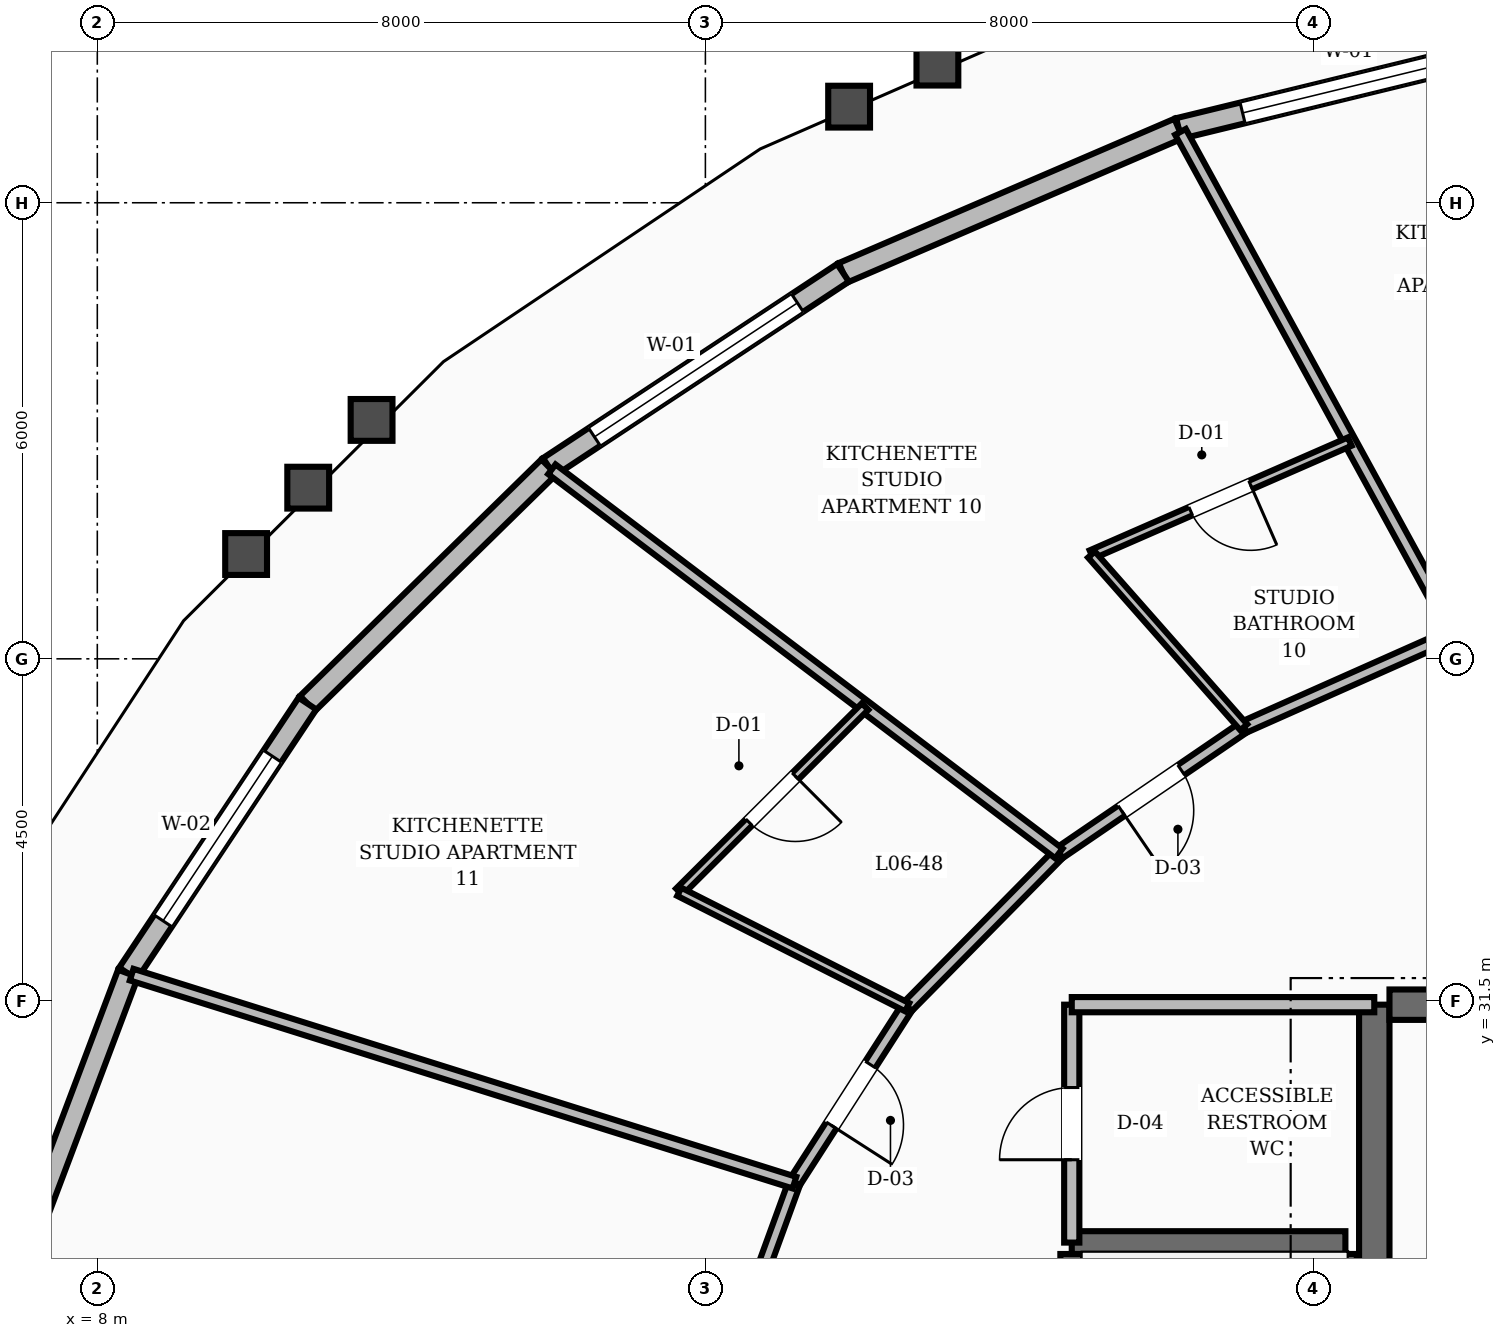
"""IFC4 building model, lengths in metres.
Left out: names, types, materials, properties, quantities, classifications, styles, units other than length and angle.
Written with IfcOpenShell. Run it as: python <this file> out.ifc"""

import sys

from ifc_helpers import new_model, si_unit, direction, frame, frame_2d, origin, place, context, subcontext, project, spatial, rectangle, extrude, element, fill, save


model = new_model("IFC4")
c1 = context("Model", 3, precision=1e-05, world=origin(), true_north=direction((0.0, 1.0)))
c2 = subcontext(c1, "Body", "Model", "MODEL_VIEW")
j1 = project(units=[si_unit("LENGTHUNIT", "METRE"), si_unit("PLANEANGLEUNIT", "RADIAN")], contexts=[c1])
p1 = place(None, origin())
s1 = spatial("IfcSite", under=j1, at=p1, CompositionType="ELEMENT")
p2 = place(p1, origin())
s2 = spatial("IfcBuilding", under=s1, at=p2, CompositionType="ELEMENT")
p3 = place(p2, frame((0.0, 0.0, 30.4)))
s3 = spatial("IfcBuildingStorey", under=s2, at=p3, CompositionType="ELEMENT", Elevation=30.4)
p4 = place(p3, frame((24.8, 25.15, 0.0), z_axis=(0.0, 0.0, 1.0), x_axis=(0.0, 1.0, 0.0)))
e1 = element("IfcWall", 1, at=p4, inside=s3, PredefinedType="SHEAR", context=c2, shape_type="SweptSolid", body=[
    extrude(rectangle(XDim=6.3, YDim=0.4, at=frame_2d((3.15, 0.0))), origin(), (0.0, 0.0, 1.0), 3.6),
])
p5 = place(p3, frame((25.0, 31.45, 0.0), z_axis=(0.0, 0.0, 1.0), x_axis=(1.0, 0.0, 0.0)))
e2 = element("IfcWall", 2, at=p5, inside=s3, PredefinedType="SHEAR", context=c2, shape_type="SweptSolid", body=[
    extrude(rectangle(XDim=3.2, YDim=0.4, at=frame_2d((1.6, 0.0))), origin(), (0.0, 0.0, 1.0), 3.6),
])
for number, where, z_axis, x_axis in (
    (3, (20.82, 19.43, 0.0), (0.0, 0.0, 1.0), (0.0, 1.0, 0.0)),
    (4, (24.42, 19.43, 0.0), (0.0, 0.0, 1.0), (0.0, 1.0, 0.0)),
):
    element("IfcWall", number, at=place(p3, frame(where, z_axis=z_axis, x_axis=x_axis)), inside=s3, PredefinedType="SHEAR", context=c2, shape_type="SweptSolid", body=[
        extrude(rectangle(XDim=8.74, YDim=0.3, at=frame_2d((4.37, 0.0))), origin(), (0.0, 0.0, 1.0), 3.6),
    ])
p6 = place(p3, frame((20.82, 28.32, 0.0), z_axis=(0.0, 0.0, 1.0), x_axis=(1.0, 0.0, 0.0)))
e5 = element("IfcWall", 5, at=p6, inside=s3, PredefinedType="SHEAR", context=c2, shape_type="SweptSolid", body=[
    extrude(rectangle(XDim=3.6, YDim=0.3, at=frame_2d((1.8, 0.0))), origin(), (0.0, 0.0, 1.0), 3.6),
])
p7 = place(p3, frame((27.017, 44.145, 0.0), z_axis=(0.0, 0.0, 1.0), x_axis=(-0.97151283312, -0.236986951292, 0.0)))
e6 = element("IfcWall", 6, at=p7, inside=s3, PredefinedType="STANDARD", context=c2, shape_type="SweptSolid", body=[
    extrude(rectangle(XDim=4.931, YDim=0.28, at=frame_2d((2.466, 0.0))), origin(), (0.0, 0.0, 1.0), 2.65),
])
p8 = place(p7, frame((0.866, 0.0, 0.8)))
e7 = element("IfcOpeningElement", 7, at=p8, cuts=e6, PredefinedType="OPENING", context=c2, shape_type="SweptSolid", body=[
    extrude(rectangle(XDim=3.2, YDim=1.65, at=frame_2d((1.6, 0.825))), frame((0.0, 0.15, 0.0), z_axis=(0.0, -1.0, 0.0), x_axis=(1.0, 0.0, 0.0)), (0.0, 0.0, 1.0), 0.3),
])
p9 = place(p3, frame((22.226, 42.977, 0.0), z_axis=(0.0, 0.0, 1.0), x_axis=(-0.918705683067, -0.394942866629, 0.0)))
e8 = element("IfcWall", 8, at=p9, inside=s3, PredefinedType="STANDARD", context=c2, shape_type="SweptSolid", body=[
    extrude(rectangle(XDim=4.806, YDim=0.28, at=frame_2d((2.403, 0.0))), origin(), (0.0, 0.0, 1.0), 2.65),
])
p10 = place(p3, frame((17.811, 41.078, 0.0), z_axis=(0.0, 0.0, 1.0), x_axis=(-0.834608922487, -0.550842941776, 0.0)))
e9 = element("IfcWall", 9, at=p10, inside=s3, PredefinedType="STANDARD", context=c2, shape_type="SweptSolid", body=[
    extrude(rectangle(XDim=4.637, YDim=0.28, at=frame_2d((2.319, 0.0))), origin(), (0.0, 0.0, 1.0), 2.65),
])
p11 = place(p10, frame((0.719, 0.0, 0.8)))
e10 = element("IfcOpeningElement", 10, at=p11, cuts=e9, PredefinedType="OPENING", context=c2, shape_type="SweptSolid", body=[
    extrude(rectangle(XDim=3.2, YDim=1.65, at=frame_2d((1.6, 0.825))), frame((0.0, 0.15, 0.0), z_axis=(0.0, -1.0, 0.0), x_axis=(1.0, 0.0, 0.0)), (0.0, 0.0, 1.0), 0.3),
])
p12 = place(p3, frame((13.94, 38.524, 0.0), z_axis=(0.0, 0.0, 1.0), x_axis=(-0.714207899037, -0.699933623248, 0.0)))
e11 = element("IfcWall", 11, at=p12, inside=s3, PredefinedType="STANDARD", context=c2, shape_type="SweptSolid", body=[
    extrude(rectangle(XDim=4.447, YDim=0.28, at=frame_2d((2.224, 0.0))), origin(), (0.0, 0.0, 1.0), 2.65),
])
p13 = place(p3, frame((10.764, 35.411, 0.0), z_axis=(0.0, 0.0, 1.0), x_axis=(-0.55356334222, -0.832807076189, 0.0)))
e12 = element("IfcWall", 12, at=p13, inside=s3, PredefinedType="STANDARD", context=c2, shape_type="SweptSolid", body=[
    extrude(rectangle(XDim=4.264, YDim=0.28, at=frame_2d((2.132, 0.0))), origin(), (0.0, 0.0, 1.0), 2.65),
])
p14 = place(p13, frame((0.832, 0.0, 0.8)))
e13 = element("IfcOpeningElement", 13, at=p14, cuts=e12, PredefinedType="OPENING", context=c2, shape_type="SweptSolid", body=[
    extrude(rectangle(XDim=2.6, YDim=1.65, at=frame_2d((1.3, 0.825))), frame((0.0, 0.15, 0.0), z_axis=(0.0, -1.0, 0.0), x_axis=(1.0, 0.0, 0.0)), (0.0, 0.0, 1.0), 0.3),
])
p15 = place(p3, frame((8.404, 31.86, 0.0), z_axis=(0.0, 0.0, 1.0), x_axis=(-0.352909401731, -0.935657498324, 0.0)))
e14 = element("IfcWall", 14, at=p15, inside=s3, PredefinedType="STANDARD", context=c2, shape_type="SweptSolid", body=[
    extrude(rectangle(XDim=4.118, YDim=0.28, at=frame_2d((2.059, 0.0))), origin(), (0.0, 0.0, 1.0), 2.65),
])
p16 = place(p3, frame((20.82, 28.32, 0.0), z_axis=(0.0, 0.0, 1.0), x_axis=(0.0, 1.0, 0.0)))
e15 = element("IfcWall", 15, at=p16, inside=s3, PredefinedType="SOLIDWALL", context=c2, shape_type="SweptSolid", body=[
    extrude(rectangle(XDim=3.13, YDim=0.2, at=frame_2d((1.565, 0.0))), origin(), (0.0, 0.0, 1.0), 2.61),
])
p17 = place(p16, frame((1.09, 0.0, 0.0)))
e16 = element("IfcOpeningElement", 16, at=p17, cuts=e15, PredefinedType="OPENING", context=c2, shape_type="SweptSolid", body=[
    extrude(rectangle(XDim=0.95, YDim=2.1, at=frame_2d((0.475, 1.05))), frame((0.0, 0.11, 0.0), z_axis=(0.0, -1.0, 0.0), x_axis=(1.0, 0.0, 0.0)), (0.0, 0.0, 1.0), 0.22),
])
p18 = place(p3, frame((20.82, 31.45, 0.0), z_axis=(0.0, 0.0, 1.0), x_axis=(1.0, 0.0, 0.0)))
e17 = element("IfcWall", 17, at=p18, inside=s3, PredefinedType="SOLIDWALL", context=c2, shape_type="SweptSolid", body=[
    extrude(rectangle(XDim=3.98, YDim=0.2, at=frame_2d((1.99, 0.0))), origin(), (0.0, 0.0, 1.0), 2.61),
])
p19 = place(p3, frame((25.858, 36.334, 0.0), z_axis=(0.0, 0.0, 1.0), x_axis=(-0.913768445178, -0.406235434936, 0.0)))
e18 = element("IfcWall", 18, at=p19, inside=s3, PredefinedType="SOLIDWALL", context=c2, shape_type="SweptSolid", body=[
    extrude(rectangle(XDim=3.037, YDim=0.16, at=frame_2d((1.519, 0.0))), origin(), (0.0, 0.0, 1.0), 2.61),
])
p20 = place(p3, frame((23.083, 35.1, 0.0), z_axis=(0.0, 0.0, 1.0), x_axis=(-0.825929039072, -0.563774088104, 0.0)))
e19 = element("IfcWall", 19, at=p20, inside=s3, PredefinedType="SOLIDWALL", context=c2, shape_type="SweptSolid", body=[
    extrude(rectangle(XDim=2.945, YDim=0.16, at=frame_2d((1.472, 0.0))), origin(), (0.0, 0.0, 1.0), 2.61),
])
p21 = place(p20, frame((0.997, 0.0, 0.0)))
e20 = element("IfcOpeningElement", 20, at=p21, cuts=e19, PredefinedType="OPENING", context=c2, shape_type="SweptSolid", body=[
    extrude(rectangle(XDim=0.95, YDim=2.1, at=frame_2d((0.475, 1.05))), frame((0.0, 0.09, 0.0), z_axis=(0.0, -1.0, 0.0), x_axis=(1.0, 0.0, 0.0)), (0.0, 0.0, 1.0), 0.18),
])
p22 = place(p3, frame((20.651, 33.44, 0.0), z_axis=(0.0, 0.0, 1.0), x_axis=(-0.702366174226, -0.711815816981, 0.0)))
e21 = element("IfcWall", 21, at=p22, inside=s3, PredefinedType="SOLIDWALL", context=c2, shape_type="SweptSolid", body=[
    extrude(rectangle(XDim=2.842, YDim=0.16, at=frame_2d((1.421, 0.0))), origin(), (0.0, 0.0, 1.0), 2.61),
])
p23 = place(p3, frame((18.655, 31.417, 0.0), z_axis=(0.0, 0.0, 1.0), x_axis=(-0.540595670038, -0.841282545603, 0.0)))
e22 = element("IfcWall", 22, at=p23, inside=s3, PredefinedType="SOLIDWALL", context=c2, shape_type="SweptSolid", body=[
    extrude(rectangle(XDim=2.744, YDim=0.16, at=frame_2d((1.372, 0.0))), origin(), (0.0, 0.0, 1.0), 2.61),
])
p24 = place(p23, frame((0.897, 0.0, 0.0)))
e23 = element("IfcOpeningElement", 23, at=p24, cuts=e22, PredefinedType="OPENING", context=c2, shape_type="SweptSolid", body=[
    extrude(rectangle(XDim=0.95, YDim=2.1, at=frame_2d((0.475, 1.05))), frame((0.0, 0.09, 0.0), z_axis=(0.0, -1.0, 0.0), x_axis=(1.0, 0.0, 0.0)), (0.0, 0.0, 1.0), 0.18),
])
p25 = place(p3, frame((17.172, 29.109, 0.0), z_axis=(0.0, 0.0, 1.0), x_axis=(-0.342617982381, -0.939474809747, 0.0)))
e24 = element("IfcWall", 24, at=p25, inside=s3, PredefinedType="SOLIDWALL", context=c2, shape_type="SweptSolid", body=[
    extrude(rectangle(XDim=2.666, YDim=0.16, at=frame_2d((1.333, 0.0))), origin(), (0.0, 0.0, 1.0), 2.61),
])
p26 = place(p3, frame((25.858, 36.334, 0.0), z_axis=(0.0, 0.0, 1.0), x_axis=(-0.479700277593, 0.877432415447, 0.0)))
e25 = element("IfcWall", 25, at=p26, inside=s3, PredefinedType="SOLIDWALL", context=c2, shape_type="SweptSolid", body=[
    extrude(rectangle(XDim=7.521, YDim=0.16, at=frame_2d((3.76, 0.0))), origin(), (0.0, 0.0, 1.0), 2.61),
])
p27 = place(p3, frame((24.478, 38.858, 0.0), z_axis=(0.0, 0.0, 1.0), x_axis=(-0.916219264282, -0.400677251361, 0.0)))
e26 = element("IfcWall", 26, at=p27, inside=s3, PredefinedType="PARTITIONING", context=c2, shape_type="SweptSolid", body=[
    extrude(rectangle(XDim=3.709, YDim=0.12, at=frame_2d((1.854, 0.0))), origin(), (0.0, 0.0, 1.0), 2.61),
])
p28 = place(p27, frame((1.425, 0.0, 0.0)))
e27 = element("IfcOpeningElement", 27, at=p28, cuts=e26, PredefinedType="OPENING", context=c2, shape_type="SweptSolid", body=[
    extrude(rectangle(XDim=0.86, YDim=2.1, at=frame_2d((0.43, 1.05))), frame((0.0, 0.07, 0.0), z_axis=(0.0, -1.0, 0.0), x_axis=(1.0, 0.0, 0.0)), (0.0, 0.0, 1.0), 0.14),
])
p29 = place(p3, frame((23.083, 35.1, 0.0), z_axis=(0.0, 0.0, 1.0), x_axis=(-0.661427007528, 0.750009542414, 0.0)))
e28 = element("IfcWall", 28, at=p29, inside=s3, PredefinedType="PARTITIONING", context=c2, shape_type="SweptSolid", body=[
    extrude(rectangle(XDim=3.029, YDim=0.12, at=frame_2d((1.515, 0.0))), origin(), (0.0, 0.0, 1.0), 2.61),
])
p30 = place(p3, frame((20.651, 33.44, 0.0), z_axis=(0.0, 0.0, 1.0), x_axis=(-0.797056829768, 0.603904305433, 0.0)))
e29 = element("IfcWall", 29, at=p30, inside=s3, PredefinedType="SOLIDWALL", context=c2, shape_type="SweptSolid", body=[
    extrude(rectangle(XDim=8.369, YDim=0.16, at=frame_2d((4.185, 0.0))), origin(), (0.0, 0.0, 1.0), 2.61),
])
p31 = place(p3, frame((18.101, 35.372, 0.0), z_axis=(0.0, 0.0, 1.0), x_axis=(-0.708166962486, -0.706045007944, 0.0)))
e30 = element("IfcWall", 30, at=p31, inside=s3, PredefinedType="PARTITIONING", context=c2, shape_type="SweptSolid", body=[
    extrude(rectangle(XDim=3.452, YDim=0.12, at=frame_2d((1.726, 0.0))), origin(), (0.0, 0.0, 1.0), 2.61),
])
p32 = place(p31, frame((1.296, 0.0, 0.0)))
e31 = element("IfcOpeningElement", 31, at=p32, cuts=e30, PredefinedType="OPENING", context=c2, shape_type="SweptSolid", body=[
    extrude(rectangle(XDim=0.86, YDim=2.1, at=frame_2d((0.43, 1.05))), frame((0.0, 0.07, 0.0), z_axis=(0.0, -1.0, 0.0), x_axis=(1.0, 0.0, 0.0)), (0.0, 0.0, 1.0), 0.14),
])
p33 = place(p3, frame((18.655, 31.417, 0.0), z_axis=(0.0, 0.0, 1.0), x_axis=(-0.892193104213, 0.451654142895, 0.0)))
e32 = element("IfcWall", 32, at=p33, inside=s3, PredefinedType="PARTITIONING", context=c2, shape_type="SweptSolid", body=[
    extrude(rectangle(XDim=3.361, YDim=0.12, at=frame_2d((1.68, 0.0))), origin(), (0.0, 0.0, 1.0), 2.61),
])
p34 = place(p3, frame((17.172, 29.109, 0.0), z_axis=(0.0, 0.0, 1.0), x_axis=(-0.954123744585, 0.299412558218, 0.0)))
e33 = element("IfcWall", 33, at=p34, inside=s3, PredefinedType="SOLIDWALL", context=c2, shape_type="SweptSolid", body=[
    extrude(rectangle(XDim=9.139, YDim=0.16, at=frame_2d((4.569, 0.0))), origin(), (0.0, 0.0, 1.0), 2.61),
])
p35 = place(p8, origin())
e34 = element("IfcWindow", 34, at=p35, inside=s3, PartitioningType="SINGLE_PANEL", PredefinedType="WINDOW", context=c2, shape_type="SweptSolid", body=[
    extrude(rectangle(XDim=3.2, YDim=1.65, at=frame_2d((1.6, 0.825))), frame((0.0, 0.03, 0.0), z_axis=(0.0, -1.0, 0.0), x_axis=(1.0, 0.0, 0.0)), (0.0, 0.0, 1.0), 0.06),
])
fill(e7, e34)
p36 = place(p11, origin())
e35 = element("IfcWindow", 35, at=p36, inside=s3, PartitioningType="SINGLE_PANEL", PredefinedType="WINDOW", context=c2, shape_type="SweptSolid", body=[
    extrude(rectangle(XDim=3.2, YDim=1.65, at=frame_2d((1.6, 0.825))), frame((0.0, 0.03, 0.0), z_axis=(0.0, -1.0, 0.0), x_axis=(1.0, 0.0, 0.0)), (0.0, 0.0, 1.0), 0.06),
])
fill(e10, e35)
p37 = place(p14, origin())
e36 = element("IfcWindow", 36, at=p37, inside=s3, PartitioningType="SINGLE_PANEL", PredefinedType="WINDOW", context=c2, shape_type="SweptSolid", body=[
    extrude(rectangle(XDim=2.6, YDim=1.65, at=frame_2d((1.3, 0.825))), frame((0.0, 0.03, 0.0), z_axis=(0.0, -1.0, 0.0), x_axis=(1.0, 0.0, 0.0)), (0.0, 0.0, 1.0), 0.06),
])
fill(e13, e36)
p38 = place(p17, origin())
e37 = element("IfcDoor", 37, at=p38, inside=s3, OperationType="SINGLE_SWING_LEFT", PredefinedType="DOOR", context=c2, shape_type="SweptSolid", body=[
    extrude(rectangle(XDim=0.95, YDim=2.1, at=frame_2d((0.475, 1.05))), frame((0.0, 0.025, 0.0), z_axis=(0.0, -1.0, 0.0), x_axis=(1.0, 0.0, 0.0)), (0.0, 0.0, 1.0), 0.05),
])
fill(e16, e37)
p39 = place(p28, origin())
e38 = element("IfcDoor", 38, at=p39, inside=s3, OperationType="SINGLE_SWING_LEFT", PredefinedType="DOOR", context=c2, shape_type="SweptSolid", body=[
    extrude(rectangle(XDim=0.86, YDim=2.1, at=frame_2d((0.43, 1.05))), frame((0.0, 0.025, 0.0), z_axis=(0.0, -1.0, 0.0), x_axis=(1.0, 0.0, 0.0)), (0.0, 0.0, 1.0), 0.05),
])
fill(e27, e38)
p40 = place(p21, origin())
e39 = element("IfcDoor", 39, at=p40, inside=s3, OperationType="SINGLE_SWING_RIGHT", PredefinedType="DOOR", context=c2, shape_type="SweptSolid", body=[
    extrude(rectangle(XDim=0.95, YDim=2.1, at=frame_2d((0.475, 1.05))), frame((0.0, 0.025, 0.0), z_axis=(0.0, -1.0, 0.0), x_axis=(1.0, 0.0, 0.0)), (0.0, 0.0, 1.0), 0.05),
])
fill(e20, e39)
p41 = place(p32, origin())
e40 = element("IfcDoor", 40, at=p41, inside=s3, OperationType="SINGLE_SWING_LEFT", PredefinedType="DOOR", context=c2, shape_type="SweptSolid", body=[
    extrude(rectangle(XDim=0.86, YDim=2.1, at=frame_2d((0.43, 1.05))), frame((0.0, 0.025, 0.0), z_axis=(0.0, -1.0, 0.0), x_axis=(1.0, 0.0, 0.0)), (0.0, 0.0, 1.0), 0.05),
])
fill(e31, e40)
p42 = place(p24, origin())
e41 = element("IfcDoor", 41, at=p42, inside=s3, OperationType="SINGLE_SWING_RIGHT", PredefinedType="DOOR", context=c2, shape_type="SweptSolid", body=[
    extrude(rectangle(XDim=0.95, YDim=2.1, at=frame_2d((0.475, 1.05))), frame((0.0, 0.025, 0.0), z_axis=(0.0, -1.0, 0.0), x_axis=(1.0, 0.0, 0.0)), (0.0, 0.0, 1.0), 0.05),
])
fill(e23, e41)
save(model, sys.argv[1])
